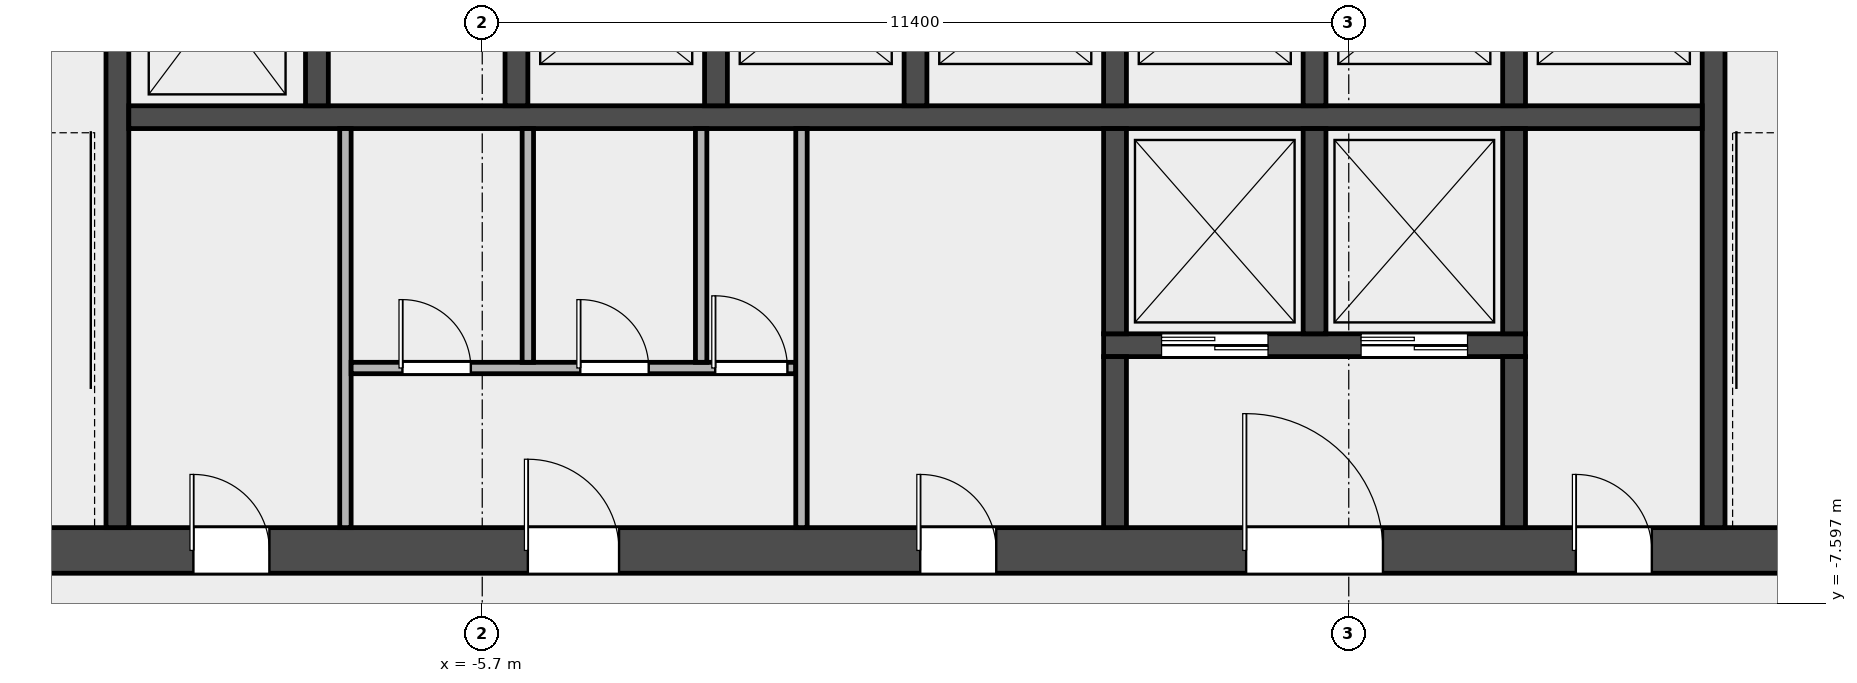
"""IFC4 building model, lengths in metres.
Left out: names, types, materials, properties, quantities, classifications, styles, units other than length and angle.
Written with IfcOpenShell. Run it as: python <this file> out.ifc"""

import sys

from ifc_helpers import new_model, si_unit, direction, frame, frame_2d, origin, place, context, subcontext, project, spatial, rectangle, extrude, element, fill, save


model = new_model("IFC4")
c1 = context("Model", 3, precision=1e-05, world=origin(), true_north=direction((0.0, 1.0)))
c2 = subcontext(c1, "Body", "Model", "MODEL_VIEW")
j1 = project(units=[si_unit("LENGTHUNIT", "METRE"), si_unit("PLANEANGLEUNIT", "RADIAN")], contexts=[c1])
p1 = place(None, origin())
s1 = spatial("IfcSite", under=j1, at=p1, CompositionType="ELEMENT")
p2 = place(p1, origin())
s2 = spatial("IfcBuilding", under=s1, at=p2, CompositionType="ELEMENT")
p3 = place(p2, frame((0.0, 0.0, 135.1)))
s3 = spatial("IfcBuildingStorey", under=s2, at=p3, CompositionType="ELEMENT", Elevation=135.1)
p4 = place(p3, frame((-14.4, -6.9, 0.0), z_axis=(0.0, 0.0, 1.0), x_axis=(1.0, 0.0, 0.0)))
e1 = element("IfcWall", 1, at=p4, inside=s3, PredefinedType="SHEAR", context=c2, shape_type="SweptSolid", body=[
    extrude(rectangle(XDim=28.8, YDim=0.6, at=frame_2d((14.4, 0.0))), origin(), (0.0, 0.0, 1.0), 4.2),
])
p5 = place(p4, frame((4.9, 0.0, 0.0)))
e2 = element("IfcOpeningElement", 2, at=p5, cuts=e1, PredefinedType="OPENING", context=c2, shape_type="SweptSolid", body=[
    extrude(rectangle(XDim=1.0, YDim=2.1, at=frame_2d((0.5, 1.05))), frame((0.0, 0.312, 0.0), z_axis=(0.0, -1.0, 0.0), x_axis=(1.0, 0.0, 0.0)), (0.0, 0.0, 1.0), 0.624),
])
p6 = place(p4, frame((9.3, 0.0, 0.0)))
e3 = element("IfcOpeningElement", 3, at=p6, cuts=e1, PredefinedType="OPENING", context=c2, shape_type="SweptSolid", body=[
    extrude(rectangle(XDim=1.2, YDim=2.1, at=frame_2d((0.6, 1.05))), frame((0.0, 0.312, 0.0), z_axis=(0.0, -1.0, 0.0), x_axis=(1.0, 0.0, 0.0)), (0.0, 0.0, 1.0), 0.624),
])
p7 = place(p4, frame((14.462, 0.0, 0.0)))
e4 = element("IfcOpeningElement", 4, at=p7, cuts=e1, PredefinedType="OPENING", context=c2, shape_type="SweptSolid", body=[
    extrude(rectangle(XDim=1.0, YDim=2.1, at=frame_2d((0.5, 1.05))), frame((0.0, 0.312, 0.0), z_axis=(0.0, -1.0, 0.0), x_axis=(1.0, 0.0, 0.0)), (0.0, 0.0, 1.0), 0.624),
])
p8 = place(p4, frame((18.75, 0.0, 0.0)))
e5 = element("IfcOpeningElement", 5, at=p8, cuts=e1, PredefinedType="OPENING", context=c2, shape_type="SweptSolid", body=[
    extrude(rectangle(XDim=1.8, YDim=2.1, at=frame_2d((0.9, 1.05))), frame((0.0, 0.312, 0.0), z_axis=(0.0, -1.0, 0.0), x_axis=(1.0, 0.0, 0.0)), (0.0, 0.0, 1.0), 0.624),
])
p9 = place(p4, frame((23.087, 0.0, 0.0)))
e6 = element("IfcOpeningElement", 6, at=p9, cuts=e1, PredefinedType="OPENING", context=c2, shape_type="SweptSolid", body=[
    extrude(rectangle(XDim=1.0, YDim=2.1, at=frame_2d((0.5, 1.05))), frame((0.0, 0.312, 0.0), z_axis=(0.0, -1.0, 0.0), x_axis=(1.0, 0.0, 0.0)), (0.0, 0.0, 1.0), 0.624),
])
for number, where, z_axis, x_axis in (
    (7, (-10.5, -6.6, 0.0), (0.0, 0.0, 1.0), (0.0, 1.0, 0.0)),
    (8, (10.5, -6.6, 0.0), (0.0, 0.0, 1.0), (0.0, 1.0, 0.0)),
):
    element("IfcWall", number, at=place(p3, frame(where, z_axis=z_axis, x_axis=x_axis)), inside=s3, PredefinedType="SHEAR", context=c2, shape_type="SweptSolid", body=[
        extrude(rectangle(XDim=8.55, YDim=0.3, at=frame_2d((4.275, 0.0))), origin(), (0.0, 0.0, 1.0), 4.2),
    ])
p10 = place(p3, frame((-10.35, -1.2, 0.0), z_axis=(0.0, 0.0, 1.0), x_axis=(1.0, 0.0, 0.0)))
e9 = element("IfcWall", 9, at=p10, inside=s3, PredefinedType="SOLIDWALL", context=c2, shape_type="SweptSolid", body=[
    extrude(rectangle(XDim=20.7, YDim=0.3, at=frame_2d((10.35, 0.0))), origin(), (0.0, 0.0, 1.0), 4.2),
])
for number, where, z_axis, x_axis in (
    (10, (-7.875, -1.05, 0.0), (0.0, 0.0, 1.0), (0.0, 1.0, 0.0)),
    (11, (-5.25, -1.05, 0.0), (0.0, 0.0, 1.0), (0.0, 1.0, 0.0)),
    (12, (-2.625, -1.05, 0.0), (0.0, 0.0, 1.0), (0.0, 1.0, 0.0)),
    (13, (0.0, -1.05, 0.0), (0.0, 0.0, 1.0), (0.0, 1.0, 0.0)),
    (14, (2.625, -1.05, 0.0), (0.0, 0.0, 1.0), (0.0, 1.0, 0.0)),
    (15, (5.25, -1.05, 0.0), (0.0, 0.0, 1.0), (0.0, 1.0, 0.0)),
    (16, (7.875, -1.05, 0.0), (0.0, 0.0, 1.0), (0.0, 1.0, 0.0)),
):
    element("IfcWall", number, at=place(p3, frame(where, z_axis=z_axis, x_axis=x_axis)), inside=s3, PredefinedType="SOLIDWALL", context=c2, shape_type="SweptSolid", body=[
        extrude(rectangle(XDim=2.7, YDim=0.3, at=frame_2d((1.35, 0.0))), origin(), (0.0, 0.0, 1.0), 4.2),
    ])
p11 = place(p3, frame((2.475, -4.2, 0.0), z_axis=(0.0, 0.0, 1.0), x_axis=(1.0, 0.0, 0.0)))
e17 = element("IfcWall", 17, at=p11, inside=s3, PredefinedType="SOLIDWALL", context=c2, shape_type="SweptSolid", body=[
    extrude(rectangle(XDim=5.55, YDim=0.3, at=frame_2d((2.775, 0.0))), origin(), (0.0, 0.0, 1.0), 4.2),
])
p12 = place(p11, frame((0.762, 0.0, 0.0)))
e18 = element("IfcOpeningElement", 18, at=p12, cuts=e17, PredefinedType="OPENING", context=c2, shape_type="SweptSolid", body=[
    extrude(rectangle(XDim=1.4, YDim=2.1, at=frame_2d((0.7, 1.05))), frame((0.0, 0.162, 0.0), z_axis=(0.0, -1.0, 0.0), x_axis=(1.0, 0.0, 0.0)), (0.0, 0.0, 1.0), 0.324),
])
p13 = place(p11, frame((3.387, 0.0, 0.0)))
e19 = element("IfcOpeningElement", 19, at=p13, cuts=e17, PredefinedType="OPENING", context=c2, shape_type="SweptSolid", body=[
    extrude(rectangle(XDim=1.4, YDim=2.1, at=frame_2d((0.7, 1.05))), frame((0.0, 0.162, 0.0), z_axis=(0.0, -1.0, 0.0), x_axis=(1.0, 0.0, 0.0)), (0.0, 0.0, 1.0), 0.324),
])
p14 = place(p3, frame((2.625, -4.05, 0.0), z_axis=(0.0, 0.0, 1.0), x_axis=(0.0, 1.0, 0.0)))
e20 = element("IfcWall", 20, at=p14, inside=s3, PredefinedType="SOLIDWALL", context=c2, shape_type="SweptSolid", body=[
    extrude(rectangle(XDim=2.7, YDim=0.3, at=frame_2d((1.35, 0.0))), origin(), (0.0, 0.0, 1.0), 4.2),
])
p15 = place(p3, frame((2.625, -6.6, 0.0), z_axis=(0.0, 0.0, 1.0), x_axis=(0.0, 1.0, 0.0)))
e21 = element("IfcWall", 21, at=p15, inside=s3, PredefinedType="SOLIDWALL", context=c2, shape_type="SweptSolid", body=[
    extrude(rectangle(XDim=2.25, YDim=0.3, at=frame_2d((1.125, 0.0))), origin(), (0.0, 0.0, 1.0), 4.2),
])
for number, where, z_axis, x_axis in (
    (22, (5.25, -4.05, 0.0), (0.0, 0.0, 1.0), (0.0, 1.0, 0.0)),
    (23, (7.875, -4.05, 0.0), (0.0, 0.0, 1.0), (0.0, 1.0, 0.0)),
):
    element("IfcWall", number, at=place(p3, frame(where, z_axis=z_axis, x_axis=x_axis)), inside=s3, PredefinedType="SOLIDWALL", context=c2, shape_type="SweptSolid", body=[
        extrude(rectangle(XDim=2.7, YDim=0.3, at=frame_2d((1.35, 0.0))), origin(), (0.0, 0.0, 1.0), 4.2),
    ])
p16 = place(p3, frame((7.875, -6.6, 0.0), z_axis=(0.0, 0.0, 1.0), x_axis=(0.0, 1.0, 0.0)))
e24 = element("IfcWall", 24, at=p16, inside=s3, PredefinedType="SOLIDWALL", context=c2, shape_type="SweptSolid", body=[
    extrude(rectangle(XDim=2.25, YDim=0.3, at=frame_2d((1.125, 0.0))), origin(), (0.0, 0.0, 1.0), 4.2),
])
p17 = place(p3, frame((-7.5, -6.6, 0.0), z_axis=(0.0, 0.0, 1.0), x_axis=(0.0, 1.0, 0.0)))
e25 = element("IfcWall", 25, at=p17, inside=s3, PredefinedType="PARTITIONING", context=c2, shape_type="SweptSolid", body=[
    extrude(rectangle(XDim=5.25, YDim=0.15, at=frame_2d((2.625, 0.0))), origin(), (0.0, 0.0, 1.0), 4.2),
])
p18 = place(p3, frame((-7.425, -4.5, 0.0), z_axis=(0.0, 0.0, 1.0), x_axis=(1.0, 0.0, 0.0)))
e26 = element("IfcWall", 26, at=p18, inside=s3, PredefinedType="PARTITIONING", context=c2, shape_type="SweptSolid", body=[
    extrude(rectangle(XDim=5.85, YDim=0.15, at=frame_2d((2.925, 0.0))), origin(), (0.0, 0.0, 1.0), 4.2),
])
p19 = place(p18, frame((0.675, 0.0, 0.0)))
e27 = element("IfcOpeningElement", 27, at=p19, cuts=e26, PredefinedType="OPENING", context=c2, shape_type="SweptSolid", body=[
    extrude(rectangle(XDim=0.9, YDim=2.1, at=frame_2d((0.45, 1.05))), frame((0.0, 0.087, 0.0), z_axis=(0.0, -1.0, 0.0), x_axis=(1.0, 0.0, 0.0)), (0.0, 0.0, 1.0), 0.174),
])
p20 = place(p18, frame((3.015, 0.0, 0.0)))
e28 = element("IfcOpeningElement", 28, at=p20, cuts=e26, PredefinedType="OPENING", context=c2, shape_type="SweptSolid", body=[
    extrude(rectangle(XDim=0.9, YDim=2.1, at=frame_2d((0.45, 1.05))), frame((0.0, 0.087, 0.0), z_axis=(0.0, -1.0, 0.0), x_axis=(1.0, 0.0, 0.0)), (0.0, 0.0, 1.0), 0.174),
])
p21 = place(p18, frame((4.79, 0.0, 0.0)))
e29 = element("IfcOpeningElement", 29, at=p21, cuts=e26, PredefinedType="OPENING", context=c2, shape_type="SweptSolid", body=[
    extrude(rectangle(XDim=0.95, YDim=2.1, at=frame_2d((0.475, 1.05))), frame((0.0, 0.087, 0.0), z_axis=(0.0, -1.0, 0.0), x_axis=(1.0, 0.0, 0.0)), (0.0, 0.0, 1.0), 0.174),
])
for number, where, z_axis, x_axis in (
    (30, (-5.1, -4.425, 0.0), (0.0, 0.0, 1.0), (0.0, 1.0, 0.0)),
    (31, (-2.82, -4.425, 0.0), (0.0, 0.0, 1.0), (0.0, 1.0, 0.0)),
):
    element("IfcWall", number, at=place(p3, frame(where, z_axis=z_axis, x_axis=x_axis)), inside=s3, PredefinedType="PARTITIONING", context=c2, shape_type="SweptSolid", body=[
        extrude(rectangle(XDim=3.075, YDim=0.15, at=frame_2d((1.538, 0.0))), origin(), (0.0, 0.0, 1.0), 4.2),
    ])
p22 = place(p3, frame((-1.5, -6.6, 0.0), z_axis=(0.0, 0.0, 1.0), x_axis=(0.0, 1.0, 0.0)))
e32 = element("IfcWall", 32, at=p22, inside=s3, PredefinedType="PARTITIONING", context=c2, shape_type="SweptSolid", body=[
    extrude(rectangle(XDim=5.25, YDim=0.15, at=frame_2d((2.625, 0.0))), origin(), (0.0, 0.0, 1.0), 4.2),
])
p23 = place(p12, origin())
e33 = element("IfcDoor", 33, at=p23, inside=s3, OperationType="DOUBLE_DOOR_SLIDING", PredefinedType="DOOR", context=c2, shape_type="SweptSolid", body=[
    extrude(rectangle(XDim=1.4, YDim=2.1, at=frame_2d((0.7, 1.05))), frame((0.0, 0.025, 0.0), z_axis=(0.0, -1.0, 0.0), x_axis=(1.0, 0.0, 0.0)), (0.0, 0.0, 1.0), 0.05),
])
fill(e18, e33)
p24 = place(p13, origin())
e34 = element("IfcDoor", 34, at=p24, inside=s3, OperationType="DOUBLE_DOOR_SLIDING", PredefinedType="DOOR", context=c2, shape_type="SweptSolid", body=[
    extrude(rectangle(XDim=1.4, YDim=2.1, at=frame_2d((0.7, 1.05))), frame((0.0, 0.025, 0.0), z_axis=(0.0, -1.0, 0.0), x_axis=(1.0, 0.0, 0.0)), (0.0, 0.0, 1.0), 0.05),
])
fill(e19, e34)
p25 = place(p5, origin())
e35 = element("IfcDoor", 35, at=p25, inside=s3, OperationType="SINGLE_SWING_LEFT", PredefinedType="DOOR", context=c2, shape_type="SweptSolid", body=[
    extrude(rectangle(XDim=1.0, YDim=2.1, at=frame_2d((0.5, 1.05))), frame((0.0, 0.025, 0.0), z_axis=(0.0, -1.0, 0.0), x_axis=(1.0, 0.0, 0.0)), (0.0, 0.0, 1.0), 0.05),
])
fill(e2, e35)
p26 = place(p6, origin())
e36 = element("IfcDoor", 36, at=p26, inside=s3, OperationType="SINGLE_SWING_LEFT", PredefinedType="DOOR", context=c2, shape_type="SweptSolid", body=[
    extrude(rectangle(XDim=1.2, YDim=2.1, at=frame_2d((0.6, 1.05))), frame((0.0, 0.025, 0.0), z_axis=(0.0, -1.0, 0.0), x_axis=(1.0, 0.0, 0.0)), (0.0, 0.0, 1.0), 0.05),
])
fill(e3, e36)
p27 = place(p19, origin())
e37 = element("IfcDoor", 37, at=p27, inside=s3, OperationType="SINGLE_SWING_LEFT", PredefinedType="DOOR", context=c2, shape_type="SweptSolid", body=[
    extrude(rectangle(XDim=0.9, YDim=2.1, at=frame_2d((0.45, 1.05))), frame((0.0, 0.025, 0.0), z_axis=(0.0, -1.0, 0.0), x_axis=(1.0, 0.0, 0.0)), (0.0, 0.0, 1.0), 0.05),
])
fill(e27, e37)
p28 = place(p20, origin())
e38 = element("IfcDoor", 38, at=p28, inside=s3, OperationType="SINGLE_SWING_LEFT", PredefinedType="DOOR", context=c2, shape_type="SweptSolid", body=[
    extrude(rectangle(XDim=0.9, YDim=2.1, at=frame_2d((0.45, 1.05))), frame((0.0, 0.025, 0.0), z_axis=(0.0, -1.0, 0.0), x_axis=(1.0, 0.0, 0.0)), (0.0, 0.0, 1.0), 0.05),
])
fill(e28, e38)
p29 = place(p21, origin())
e39 = element("IfcDoor", 39, at=p29, inside=s3, OperationType="SINGLE_SWING_LEFT", PredefinedType="DOOR", context=c2, shape_type="SweptSolid", body=[
    extrude(rectangle(XDim=0.95, YDim=2.1, at=frame_2d((0.475, 1.05))), frame((0.0, 0.025, 0.0), z_axis=(0.0, -1.0, 0.0), x_axis=(1.0, 0.0, 0.0)), (0.0, 0.0, 1.0), 0.05),
])
fill(e29, e39)
p30 = place(p7, origin())
e40 = element("IfcDoor", 40, at=p30, inside=s3, OperationType="SINGLE_SWING_LEFT", PredefinedType="DOOR", context=c2, shape_type="SweptSolid", body=[
    extrude(rectangle(XDim=1.0, YDim=2.1, at=frame_2d((0.5, 1.05))), frame((0.0, 0.025, 0.0), z_axis=(0.0, -1.0, 0.0), x_axis=(1.0, 0.0, 0.0)), (0.0, 0.0, 1.0), 0.05),
])
fill(e4, e40)
p31 = place(p8, origin())
e41 = element("IfcDoor", 41, at=p31, inside=s3, OperationType="DOUBLE_DOOR_SINGLE_SWING", PredefinedType="DOOR", context=c2, shape_type="SweptSolid", body=[
    extrude(rectangle(XDim=1.8, YDim=2.1, at=frame_2d((0.9, 1.05))), frame((0.0, 0.025, 0.0), z_axis=(0.0, -1.0, 0.0), x_axis=(1.0, 0.0, 0.0)), (0.0, 0.0, 1.0), 0.05),
])
fill(e5, e41)
p32 = place(p9, origin())
e42 = element("IfcDoor", 42, at=p32, inside=s3, OperationType="SINGLE_SWING_LEFT", PredefinedType="DOOR", context=c2, shape_type="SweptSolid", body=[
    extrude(rectangle(XDim=1.0, YDim=2.1, at=frame_2d((0.5, 1.05))), frame((0.0, 0.025, 0.0), z_axis=(0.0, -1.0, 0.0), x_axis=(1.0, 0.0, 0.0)), (0.0, 0.0, 1.0), 0.05),
])
fill(e6, e42)
save(model, sys.argv[1])
